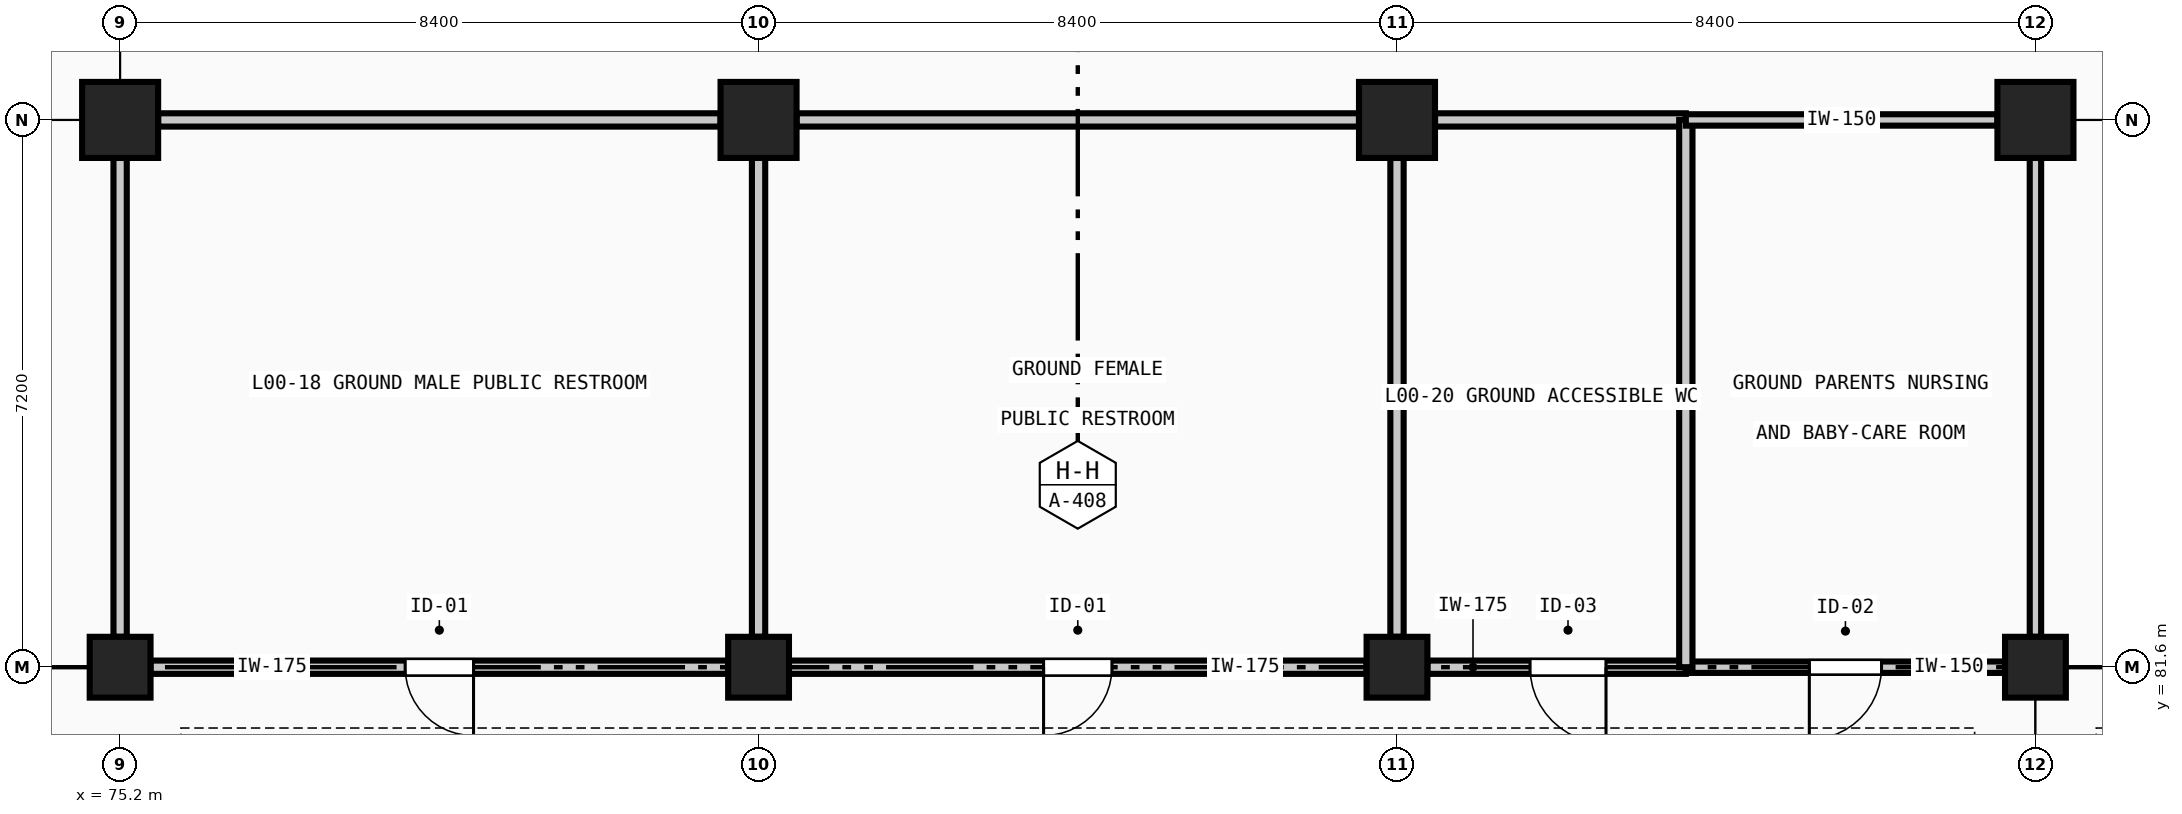
"""IFC4 building model, lengths in metres.
Left out: names, types, materials, properties, quantities, classifications, styles, units other than length and angle.
Written with IfcOpenShell. Run it as: python <this file> out.ifc"""

import sys

from ifc_helpers import new_model, si_unit, direction, frame, frame_2d, origin, origin_2d, place, context, subcontext, project, spatial, rectangle, extrude, element, fill, save


model = new_model("IFC4")
c1 = context("Model", 3, precision=1e-05, world=origin(), true_north=direction((0.0, 1.0)))
c2 = subcontext(c1, "Body", "Model", "MODEL_VIEW")
j1 = project(units=[si_unit("LENGTHUNIT", "METRE"), si_unit("PLANEANGLEUNIT", "RADIAN")], contexts=[c1])
p1 = place(None, origin())
s1 = spatial("IfcSite", under=j1, at=p1, CompositionType="ELEMENT")
p2 = place(p1, origin())
s2 = spatial("IfcBuilding", under=s1, at=p2, CompositionType="ELEMENT")
p3 = place(p2, origin())
s3 = spatial("IfcBuildingStorey", under=s2, at=p3, CompositionType="ELEMENT", Elevation=0.0)
p4 = place(p3, frame((75.2, 81.6, 0.0), z_axis=(0.0, 0.0, 1.0), x_axis=(1.0, 0.0, 0.0)))
e1 = element("IfcColumn", 1, at=p4, inside=s3, PredefinedType="COLUMN", context=c2, shape_type="SweptSolid", body=[
    extrude(rectangle(XDim=0.8, YDim=0.8, at=origin_2d()), origin(), (0.0, 0.0, 1.0), 4.8),
])
p5 = place(p3, frame((75.2, 88.8, 0.0), z_axis=(0.0, 0.0, 1.0), x_axis=(1.0, 0.0, 0.0)))
e2 = element("IfcColumn", 2, at=p5, inside=s3, PredefinedType="COLUMN", context=c2, shape_type="SweptSolid", body=[
    extrude(rectangle(XDim=1.0, YDim=1.0, at=origin_2d()), origin(), (0.0, 0.0, 1.0), 4.8),
])
p6 = place(p3, frame((83.6, 81.6, 0.0), z_axis=(0.0, 0.0, 1.0), x_axis=(1.0, 0.0, 0.0)))
e3 = element("IfcColumn", 3, at=p6, inside=s3, PredefinedType="COLUMN", context=c2, shape_type="SweptSolid", body=[
    extrude(rectangle(XDim=0.8, YDim=0.8, at=origin_2d()), origin(), (0.0, 0.0, 1.0), 4.8),
])
p7 = place(p3, frame((83.6, 88.8, 0.0), z_axis=(0.0, 0.0, 1.0), x_axis=(1.0, 0.0, 0.0)))
e4 = element("IfcColumn", 4, at=p7, inside=s3, PredefinedType="COLUMN", context=c2, shape_type="SweptSolid", body=[
    extrude(rectangle(XDim=1.0, YDim=1.0, at=origin_2d()), origin(), (0.0, 0.0, 1.0), 4.8),
])
p8 = place(p3, frame((92.0, 81.6, 0.0), z_axis=(0.0, 0.0, 1.0), x_axis=(1.0, 0.0, 0.0)))
e5 = element("IfcColumn", 5, at=p8, inside=s3, PredefinedType="COLUMN", context=c2, shape_type="SweptSolid", body=[
    extrude(rectangle(XDim=0.8, YDim=0.8, at=origin_2d()), origin(), (0.0, 0.0, 1.0), 4.8),
])
p9 = place(p3, frame((92.0, 88.8, 0.0), z_axis=(0.0, 0.0, 1.0), x_axis=(1.0, 0.0, 0.0)))
e6 = element("IfcColumn", 6, at=p9, inside=s3, PredefinedType="COLUMN", context=c2, shape_type="SweptSolid", body=[
    extrude(rectangle(XDim=1.0, YDim=1.0, at=origin_2d()), origin(), (0.0, 0.0, 1.0), 4.8),
])
p10 = place(p3, frame((100.4, 81.6, 0.0), z_axis=(0.0, 0.0, 1.0), x_axis=(1.0, 0.0, 0.0)))
e7 = element("IfcColumn", 7, at=p10, inside=s3, PredefinedType="COLUMN", context=c2, shape_type="SweptSolid", body=[
    extrude(rectangle(XDim=0.8, YDim=0.8, at=origin_2d()), origin(), (0.0, 0.0, 1.0), 4.8),
])
p11 = place(p3, frame((100.4, 88.8, 0.0), z_axis=(0.0, 0.0, 1.0), x_axis=(1.0, 0.0, 0.0)))
e8 = element("IfcColumn", 8, at=p11, inside=s3, PredefinedType="COLUMN", context=c2, shape_type="SweptSolid", body=[
    extrude(rectangle(XDim=1.0, YDim=1.0, at=origin_2d()), origin(), (0.0, 0.0, 1.0), 4.8),
])
p12 = place(p3, frame((83.2, 81.6, 0.0), z_axis=(0.0, 0.0, 1.0), x_axis=(-1.0, 0.0, 0.0)))
e9 = element("IfcWall", 9, at=p12, inside=s3, PredefinedType="PLUMBINGWALL", context=c2, shape_type="SweptSolid", body=[
    extrude(rectangle(XDim=7.6, YDim=0.175, at=frame_2d((3.8, 0.0))), origin(), (0.0, 0.0, 1.0), 4.0),
])
p13 = place(p12, frame((3.35, 0.0, 0.0)))
e10 = element("IfcOpeningElement", 10, at=p13, cuts=e9, PredefinedType="OPENING", context=c2, shape_type="SweptSolid", body=[
    extrude(rectangle(XDim=0.9, YDim=2.1, at=frame_2d((0.45, 1.05))), frame((0.0, 0.097, 0.0), z_axis=(0.0, -1.0, 0.0), x_axis=(1.0, 0.0, 0.0)), (0.0, 0.0, 1.0), 0.195),
])
p14 = place(p3, frame((91.6, 81.6, 0.0), z_axis=(0.0, 0.0, 1.0), x_axis=(-1.0, 0.0, 0.0)))
e11 = element("IfcWall", 11, at=p14, inside=s3, PredefinedType="PLUMBINGWALL", context=c2, shape_type="SweptSolid", body=[
    extrude(rectangle(XDim=7.6, YDim=0.175, at=frame_2d((3.8, 0.0))), origin(), (0.0, 0.0, 1.0), 4.0),
])
p15 = place(p14, frame((3.35, 0.0, 0.0)))
e12 = element("IfcOpeningElement", 12, at=p15, cuts=e11, PredefinedType="OPENING", context=c2, shape_type="SweptSolid", body=[
    extrude(rectangle(XDim=0.9, YDim=2.1, at=frame_2d((0.45, 1.05))), frame((0.0, 0.097, 0.0), z_axis=(0.0, -1.0, 0.0), x_axis=(1.0, 0.0, 0.0)), (0.0, 0.0, 1.0), 0.195),
])
p16 = place(p3, frame((95.8, 81.6, 0.0), z_axis=(0.0, 0.0, 1.0), x_axis=(-1.0, 0.0, 0.0)))
e13 = element("IfcWall", 13, at=p16, inside=s3, PredefinedType="PLUMBINGWALL", context=c2, shape_type="SweptSolid", body=[
    extrude(rectangle(XDim=3.4, YDim=0.175, at=frame_2d((1.7, 0.0))), origin(), (0.0, 0.0, 1.0), 4.0),
])
p17 = place(p16, frame((1.05, 0.0, 0.0)))
e14 = element("IfcOpeningElement", 14, at=p17, cuts=e13, PredefinedType="OPENING", context=c2, shape_type="SweptSolid", body=[
    extrude(rectangle(XDim=1.0, YDim=2.15, at=frame_2d((0.5, 1.075))), frame((0.0, 0.097, 0.0), z_axis=(0.0, -1.0, 0.0), x_axis=(1.0, 0.0, 0.0)), (0.0, 0.0, 1.0), 0.195),
])
p18 = place(p3, frame((100.0, 81.6, 0.0), z_axis=(0.0, 0.0, 1.0), x_axis=(-1.0, 0.0, 0.0)))
e15 = element("IfcWall", 15, at=p18, inside=s3, PredefinedType="PARTITIONING", context=c2, shape_type="SweptSolid", body=[
    extrude(rectangle(XDim=4.2, YDim=0.15, at=frame_2d((2.1, 0.0))), origin(), (0.0, 0.0, 1.0), 4.0),
])
p19 = place(p18, frame((1.625, 0.0, 0.0)))
e16 = element("IfcOpeningElement", 16, at=p19, cuts=e15, PredefinedType="OPENING", context=c2, shape_type="SweptSolid", body=[
    extrude(rectangle(XDim=0.95, YDim=2.15, at=frame_2d((0.475, 1.075))), frame((0.0, 0.085, 0.0), z_axis=(0.0, -1.0, 0.0), x_axis=(1.0, 0.0, 0.0)), (0.0, 0.0, 1.0), 0.17),
])
p20 = place(p3, frame((75.7, 88.8, 0.0), z_axis=(0.0, 0.0, 1.0), x_axis=(1.0, 0.0, 0.0)))
e17 = element("IfcWall", 17, at=p20, inside=s3, PredefinedType="PLUMBINGWALL", context=c2, shape_type="SweptSolid", body=[
    extrude(rectangle(XDim=7.4, YDim=0.175, at=frame_2d((3.7, 0.0))), origin(), (0.0, 0.0, 1.0), 3.85),
])
for number, where, z_axis, x_axis in (
    (18, (75.2, 82.0, 0.0), (0.0, 0.0, 1.0), (0.0, 1.0, 0.0)),
    (19, (83.6, 88.3, 0.0), (0.0, 0.0, 1.0), (0.0, -1.0, 0.0)),
):
    element("IfcWall", number, at=place(p3, frame(where, z_axis=z_axis, x_axis=x_axis)), inside=s3, PredefinedType="PLUMBINGWALL", context=c2, shape_type="SweptSolid", body=[
        extrude(rectangle(XDim=6.3, YDim=0.175, at=frame_2d((3.15, 0.0))), origin(), (0.0, 0.0, 1.0), 4.05),
    ])
p21 = place(p3, frame((84.1, 88.8, 0.0), z_axis=(0.0, 0.0, 1.0), x_axis=(1.0, 0.0, 0.0)))
e20 = element("IfcWall", 20, at=p21, inside=s3, PredefinedType="PLUMBINGWALL", context=c2, shape_type="SweptSolid", body=[
    extrude(rectangle(XDim=7.4, YDim=0.175, at=frame_2d((3.7, 0.0))), origin(), (0.0, 0.0, 1.0), 3.85),
])
p22 = place(p3, frame((92.0, 88.3, 0.0), z_axis=(0.0, 0.0, 1.0), x_axis=(0.0, -1.0, 0.0)))
e21 = element("IfcWall", 21, at=p22, inside=s3, PredefinedType="PLUMBINGWALL", context=c2, shape_type="SweptSolid", body=[
    extrude(rectangle(XDim=6.3, YDim=0.175, at=frame_2d((3.15, 0.0))), origin(), (0.0, 0.0, 1.0), 4.05),
])
p23 = place(p3, frame((92.5, 88.8, 0.0), z_axis=(0.0, 0.0, 1.0), x_axis=(1.0, 0.0, 0.0)))
e22 = element("IfcWall", 22, at=p23, inside=s3, PredefinedType="PLUMBINGWALL", context=c2, shape_type="SweptSolid", body=[
    extrude(rectangle(XDim=3.3, YDim=0.175, at=frame_2d((1.65, 0.0))), origin(), (0.0, 0.0, 1.0), 3.85),
])
p24 = place(p3, frame((95.8, 88.8, 0.0), z_axis=(0.0, 0.0, 1.0), x_axis=(0.0, -1.0, 0.0)))
e23 = element("IfcWall", 23, at=p24, inside=s3, PredefinedType="PLUMBINGWALL", context=c2, shape_type="SweptSolid", body=[
    extrude(rectangle(XDim=7.2, YDim=0.175, at=frame_2d((3.6, 0.0))), origin(), (0.0, 0.0, 1.0), 4.525),
])
p25 = place(p3, frame((95.8, 88.8, 0.0), z_axis=(0.0, 0.0, 1.0), x_axis=(1.0, 0.0, 0.0)))
e24 = element("IfcWall", 24, at=p25, inside=s3, PredefinedType="PARTITIONING", context=c2, shape_type="SweptSolid", body=[
    extrude(rectangle(XDim=4.1, YDim=0.15, at=frame_2d((2.05, 0.0))), origin(), (0.0, 0.0, 1.0), 3.85),
])
p26 = place(p3, frame((100.4, 88.3, 0.0), z_axis=(0.0, 0.0, 1.0), x_axis=(0.0, -1.0, 0.0)))
e25 = element("IfcWall", 25, at=p26, inside=s3, PredefinedType="PARTITIONING", context=c2, shape_type="SweptSolid", body=[
    extrude(rectangle(XDim=6.3, YDim=0.15, at=frame_2d((3.15, 0.0))), origin(), (0.0, 0.0, 1.0), 4.05),
])
p27 = place(p13, origin())
e26 = element("IfcDoor", 26, at=p27, inside=s3, OperationType="SINGLE_SWING_LEFT", PredefinedType="DOOR", context=c2, shape_type="SweptSolid", body=[
    extrude(rectangle(XDim=0.9, YDim=2.1, at=frame_2d((0.45, 1.05))), frame((0.0, 0.025, 0.0), z_axis=(0.0, -1.0, 0.0), x_axis=(1.0, 0.0, 0.0)), (0.0, 0.0, 1.0), 0.05),
])
fill(e10, e26)
p28 = place(p15, origin())
e27 = element("IfcDoor", 27, at=p28, inside=s3, OperationType="SINGLE_SWING_RIGHT", PredefinedType="DOOR", context=c2, shape_type="SweptSolid", body=[
    extrude(rectangle(XDim=0.9, YDim=2.1, at=frame_2d((0.45, 1.05))), frame((0.0, 0.025, 0.0), z_axis=(0.0, -1.0, 0.0), x_axis=(1.0, 0.0, 0.0)), (0.0, 0.0, 1.0), 0.05),
])
fill(e12, e27)
p29 = place(p17, origin())
e28 = element("IfcDoor", 28, at=p29, inside=s3, OperationType="SINGLE_SWING_LEFT", PredefinedType="DOOR", context=c2, shape_type="SweptSolid", body=[
    extrude(rectangle(XDim=1.0, YDim=2.15, at=frame_2d((0.5, 1.075))), frame((0.0, 0.025, 0.0), z_axis=(0.0, -1.0, 0.0), x_axis=(1.0, 0.0, 0.0)), (0.0, 0.0, 1.0), 0.05),
])
fill(e14, e28)
p30 = place(p19, origin())
e29 = element("IfcDoor", 29, at=p30, inside=s3, OperationType="SINGLE_SWING_RIGHT", PredefinedType="DOOR", context=c2, shape_type="SweptSolid", body=[
    extrude(rectangle(XDim=0.95, YDim=2.15, at=frame_2d((0.475, 1.075))), frame((0.0, 0.025, 0.0), z_axis=(0.0, -1.0, 0.0), x_axis=(1.0, 0.0, 0.0)), (0.0, 0.0, 1.0), 0.05),
])
fill(e16, e29)
save(model, sys.argv[1])
